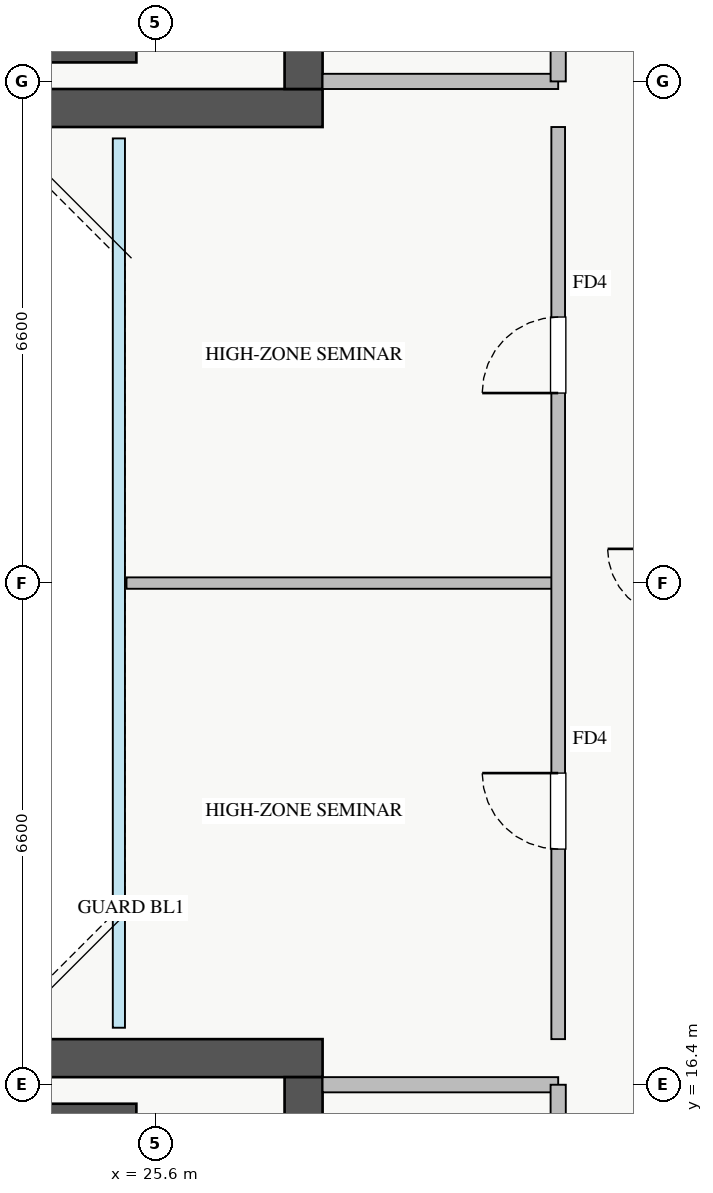
"""IFC4 building model, lengths in metres.
Left out: names, types, materials, properties, quantities, classifications, styles, units other than length and angle.
Written with IfcOpenShell. Run it as: python <this file> out.ifc"""

import sys

from ifc_helpers import new_model, si_unit, direction, frame, frame_2d, origin, place, context, subcontext, project, spatial, rectangle, extrude, source, transform, mapped, element, fill, save


model = new_model("IFC4")
c1 = context("Model", 3, precision=1e-05, world=origin(), true_north=direction((0.0, 1.0)))
c2 = subcontext(c1, "Body", "Model", "MODEL_VIEW")
j1 = project(units=[si_unit("LENGTHUNIT", "METRE"), si_unit("PLANEANGLEUNIT", "RADIAN")], contexts=[c1])
p1 = place(None, origin())
s1 = spatial("IfcSite", under=j1, at=p1, CompositionType="ELEMENT")
p2 = place(p1, origin())
s2 = spatial("IfcBuilding", under=s1, at=p2, CompositionType="ELEMENT")
p3 = place(p2, frame((0.0, 0.0, 229.5)))
s3 = spatial("IfcBuildingStorey", under=s2, at=p3, CompositionType="ELEMENT", Elevation=229.5)
for number, where, z_axis, x_axis in (
    (1, (18.2, 29.95, 0.0), (0.0, 0.0, 1.0), (1.0, 0.0, 0.0)),
    (2, (18.2, 16.05, 0.0), (0.0, 0.0, 1.0), (1.0, 0.0, 0.0)),
):
    element("IfcWall", number, at=place(p3, frame(where, z_axis=z_axis, x_axis=x_axis)), inside=s3, PredefinedType="SHEAR", context=c2, shape_type="SweptSolid", body=[
        extrude(rectangle(XDim=7.15, YDim=0.2, at=frame_2d((3.575, 0.0))), origin(), (0.0, 0.0, 1.0), 3.25),
    ])
p4 = place(p3, frame((10.2, 29.25, 0.0), z_axis=(0.0, 0.0, 1.0), x_axis=(1.0, 0.0, 0.0)))
e3 = element("IfcWall", 3, at=p4, inside=s3, PredefinedType="SHEAR", context=c2, shape_type="SweptSolid", body=[
    extrude(rectangle(XDim=17.6, YDim=0.5, at=frame_2d((8.8, 0.0))), origin(), (0.0, 0.0, 1.0), 3.25),
])
p5 = place(p3, frame((27.55, 29.5, 0.0), z_axis=(0.0, 0.0, 1.0), x_axis=(0.0, 1.0, 0.0)))
e4 = element("IfcWall", 4, at=p5, inside=s3, PredefinedType="SHEAR", context=c2, shape_type="SweptSolid", body=[
    extrude(rectangle(XDim=6.2, YDim=0.5, at=frame_2d((3.1, 0.0))), origin(), (0.0, 0.0, 1.0), 3.25),
])
p6 = place(p5, frame((1.1, 0.0, 0.0)))
e5 = element("IfcOpeningElement", 5, at=p6, cuts=e4, PredefinedType="OPENING", context=c2, shape_type="SweptSolid", body=[
    extrude(rectangle(XDim=1.3, YDim=2.05, at=frame_2d((0.65, 1.025))), frame((0.0, 0.26, 0.0), z_axis=(0.0, -1.0, 0.0), x_axis=(1.0, 0.0, 0.0)), (0.0, 0.0, 1.0), 0.52),
])
p7 = place(p3, frame((10.2, 16.75, 0.0), z_axis=(0.0, 0.0, 1.0), x_axis=(1.0, 0.0, 0.0)))
e6 = element("IfcWall", 6, at=p7, inside=s3, PredefinedType="SHEAR", context=c2, shape_type="SweptSolid", body=[
    extrude(rectangle(XDim=17.6, YDim=0.5, at=frame_2d((8.8, 0.0))), origin(), (0.0, 0.0, 1.0), 3.25),
])
p8 = place(p3, frame((27.55, 10.3, 0.0), z_axis=(0.0, 0.0, 1.0), x_axis=(0.0, 1.0, 0.0)))
e7 = element("IfcWall", 7, at=p8, inside=s3, PredefinedType="SHEAR", context=c2, shape_type="SweptSolid", body=[
    extrude(rectangle(XDim=6.2, YDim=0.5, at=frame_2d((3.1, 0.0))), origin(), (0.0, 0.0, 1.0), 3.25),
])
p9 = place(p8, frame((2.1, 0.0, 0.0)))
e8 = element("IfcOpeningElement", 8, at=p9, cuts=e7, PredefinedType="OPENING", context=c2, shape_type="SweptSolid", body=[
    extrude(rectangle(XDim=1.3, YDim=2.05, at=frame_2d((0.65, 1.025))), frame((0.0, 0.26, 0.0), z_axis=(0.0, -1.0, 0.0), x_axis=(1.0, 0.0, 0.0)), (0.0, 0.0, 1.0), 0.52),
])
p10 = place(p3, frame((27.8, 29.6, 0.0), z_axis=(0.0, 0.0, 1.0), x_axis=(1.0, 0.0, 0.0)))
e9 = element("IfcWall", 9, at=p10, inside=s3, PredefinedType="PARTITIONING", context=c2, shape_type="SweptSolid", body=[
    extrude(rectangle(XDim=3.1, YDim=0.2, at=frame_2d((1.55, 0.0))), origin(), (0.0, 0.0, 1.0), 3.03),
])
p11 = place(p3, frame((30.9, 29.6, 0.0), z_axis=(0.0, 0.0, 1.0), x_axis=(0.0, 1.0, 0.0)))
e10 = element("IfcWall", 10, at=p11, inside=s3, PredefinedType="PARTITIONING", context=c2, shape_type="SweptSolid", body=[
    extrude(rectangle(XDim=3.9, YDim=0.2, at=frame_2d((1.95, 0.0))), origin(), (0.0, 0.0, 1.0), 3.03),
])
p12 = place(p11, frame((1.4, 0.0, 0.0)))
e11 = element("IfcOpeningElement", 11, at=p12, cuts=e10, PredefinedType="OPENING", context=c2, shape_type="SweptSolid", body=[
    extrude(rectangle(XDim=1.1, YDim=2.05, at=frame_2d((0.55, 1.025))), frame((0.0, 0.11, 0.0), z_axis=(0.0, -1.0, 0.0), x_axis=(1.0, 0.0, 0.0)), (0.0, 0.0, 1.0), 0.22),
])
p13 = place(p3, frame((27.8, 16.4, 0.0), z_axis=(0.0, 0.0, 1.0), x_axis=(1.0, 0.0, 0.0)))
e12 = element("IfcWall", 12, at=p13, inside=s3, PredefinedType="PARTITIONING", context=c2, shape_type="SweptSolid", body=[
    extrude(rectangle(XDim=3.1, YDim=0.2, at=frame_2d((1.55, 0.0))), origin(), (0.0, 0.0, 1.0), 3.03),
])
p14 = place(p3, frame((30.9, 12.5, 0.0), z_axis=(0.0, 0.0, 1.0), x_axis=(0.0, 1.0, 0.0)))
e13 = element("IfcWall", 13, at=p14, inside=s3, PredefinedType="PARTITIONING", context=c2, shape_type="SweptSolid", body=[
    extrude(rectangle(XDim=3.9, YDim=0.2, at=frame_2d((1.95, 0.0))), origin(), (0.0, 0.0, 1.0), 3.03),
])
p15 = place(p14, frame((1.4, 0.0, 0.0)))
e14 = element("IfcOpeningElement", 14, at=p15, cuts=e13, PredefinedType="OPENING", context=c2, shape_type="SweptSolid", body=[
    extrude(rectangle(XDim=1.1, YDim=2.05, at=frame_2d((0.55, 1.025))), frame((0.0, 0.11, 0.0), z_axis=(0.0, -1.0, 0.0), x_axis=(1.0, 0.0, 0.0)), (0.0, 0.0, 1.0), 0.22),
])
p16 = place(p3, frame((25.22, 23.0, 0.0), z_axis=(0.0, 0.0, 1.0), x_axis=(1.0, 0.0, 0.0)))
e15 = element("IfcWall", 15, at=p16, inside=s3, PredefinedType="PARTITIONING", context=c2, shape_type="SweptSolid", body=[
    extrude(rectangle(XDim=5.68, YDim=0.15, at=frame_2d((2.84, 0.0))), origin(), (0.0, 0.0, 1.0), 3.03),
])
p17 = place(p3, frame((30.9, 17.0, 0.0), z_axis=(0.0, 0.0, 1.0), x_axis=(0.0, 1.0, 0.0)))
e16 = element("IfcWall", 16, at=p17, inside=s3, PredefinedType="PARTITIONING", context=c2, shape_type="SweptSolid", body=[
    extrude(rectangle(XDim=12.0, YDim=0.18, at=frame_2d((6.0, 0.0))), origin(), (0.0, 0.0, 1.0), 3.03),
])
p18 = place(p17, frame((2.5, 0.0, 0.0)))
e17 = element("IfcOpeningElement", 17, at=p18, cuts=e16, PredefinedType="OPENING", context=c2, shape_type="SweptSolid", body=[
    extrude(rectangle(XDim=1.0, YDim=2.05, at=frame_2d((0.5, 1.025))), frame((0.0, 0.1, 0.0), z_axis=(0.0, -1.0, 0.0), x_axis=(1.0, 0.0, 0.0)), (0.0, 0.0, 1.0), 0.2),
])
p19 = place(p17, frame((8.5, 0.0, 0.0)))
e18 = element("IfcOpeningElement", 18, at=p19, cuts=e16, PredefinedType="OPENING", context=c2, shape_type="SweptSolid", body=[
    extrude(rectangle(XDim=1.0, YDim=2.05, at=frame_2d((0.5, 1.025))), frame((0.0, 0.1, 0.0), z_axis=(0.0, -1.0, 0.0), x_axis=(1.0, 0.0, 0.0)), (0.0, 0.0, 1.0), 0.2),
])
m1 = source(origin(), c2, "Body", "SweptSolid", [
    extrude(rectangle(XDim=1.0, YDim=2.05, at=frame_2d((0.5, 1.025))), frame((0.0, 0.025, 0.0), z_axis=(0.0, -1.0, 0.0), x_axis=(1.0, 0.0, 0.0)), (0.0, 0.0, 1.0), 0.05),
])
p20 = place(p18, origin())
e19 = element("IfcDoor", 19, at=p20, inside=s3, OperationType="SINGLE_SWING_RIGHT", PredefinedType="DOOR", context=c2, shape_type="MappedRepresentation", body=[
    mapped(m1, transform((0.0, 0.0, 0.0), x_axis=(1.0, 0.0, 0.0), y_axis=(0.0, 1.0, 0.0), z_axis=(0.0, 0.0, 1.0), scale=1.0)),
])
fill(e17, e19)
p21 = place(p19, origin())
e20 = element("IfcDoor", 20, at=p21, inside=s3, OperationType="SINGLE_SWING_LEFT", PredefinedType="DOOR", context=c2, shape_type="MappedRepresentation", body=[
    mapped(m1, transform((0.0, 0.0, 0.0), x_axis=(1.0, 0.0, 0.0), y_axis=(0.0, 1.0, 0.0), z_axis=(0.0, 0.0, 1.0), scale=1.0)),
])
fill(e18, e20)
save(model, sys.argv[1])
